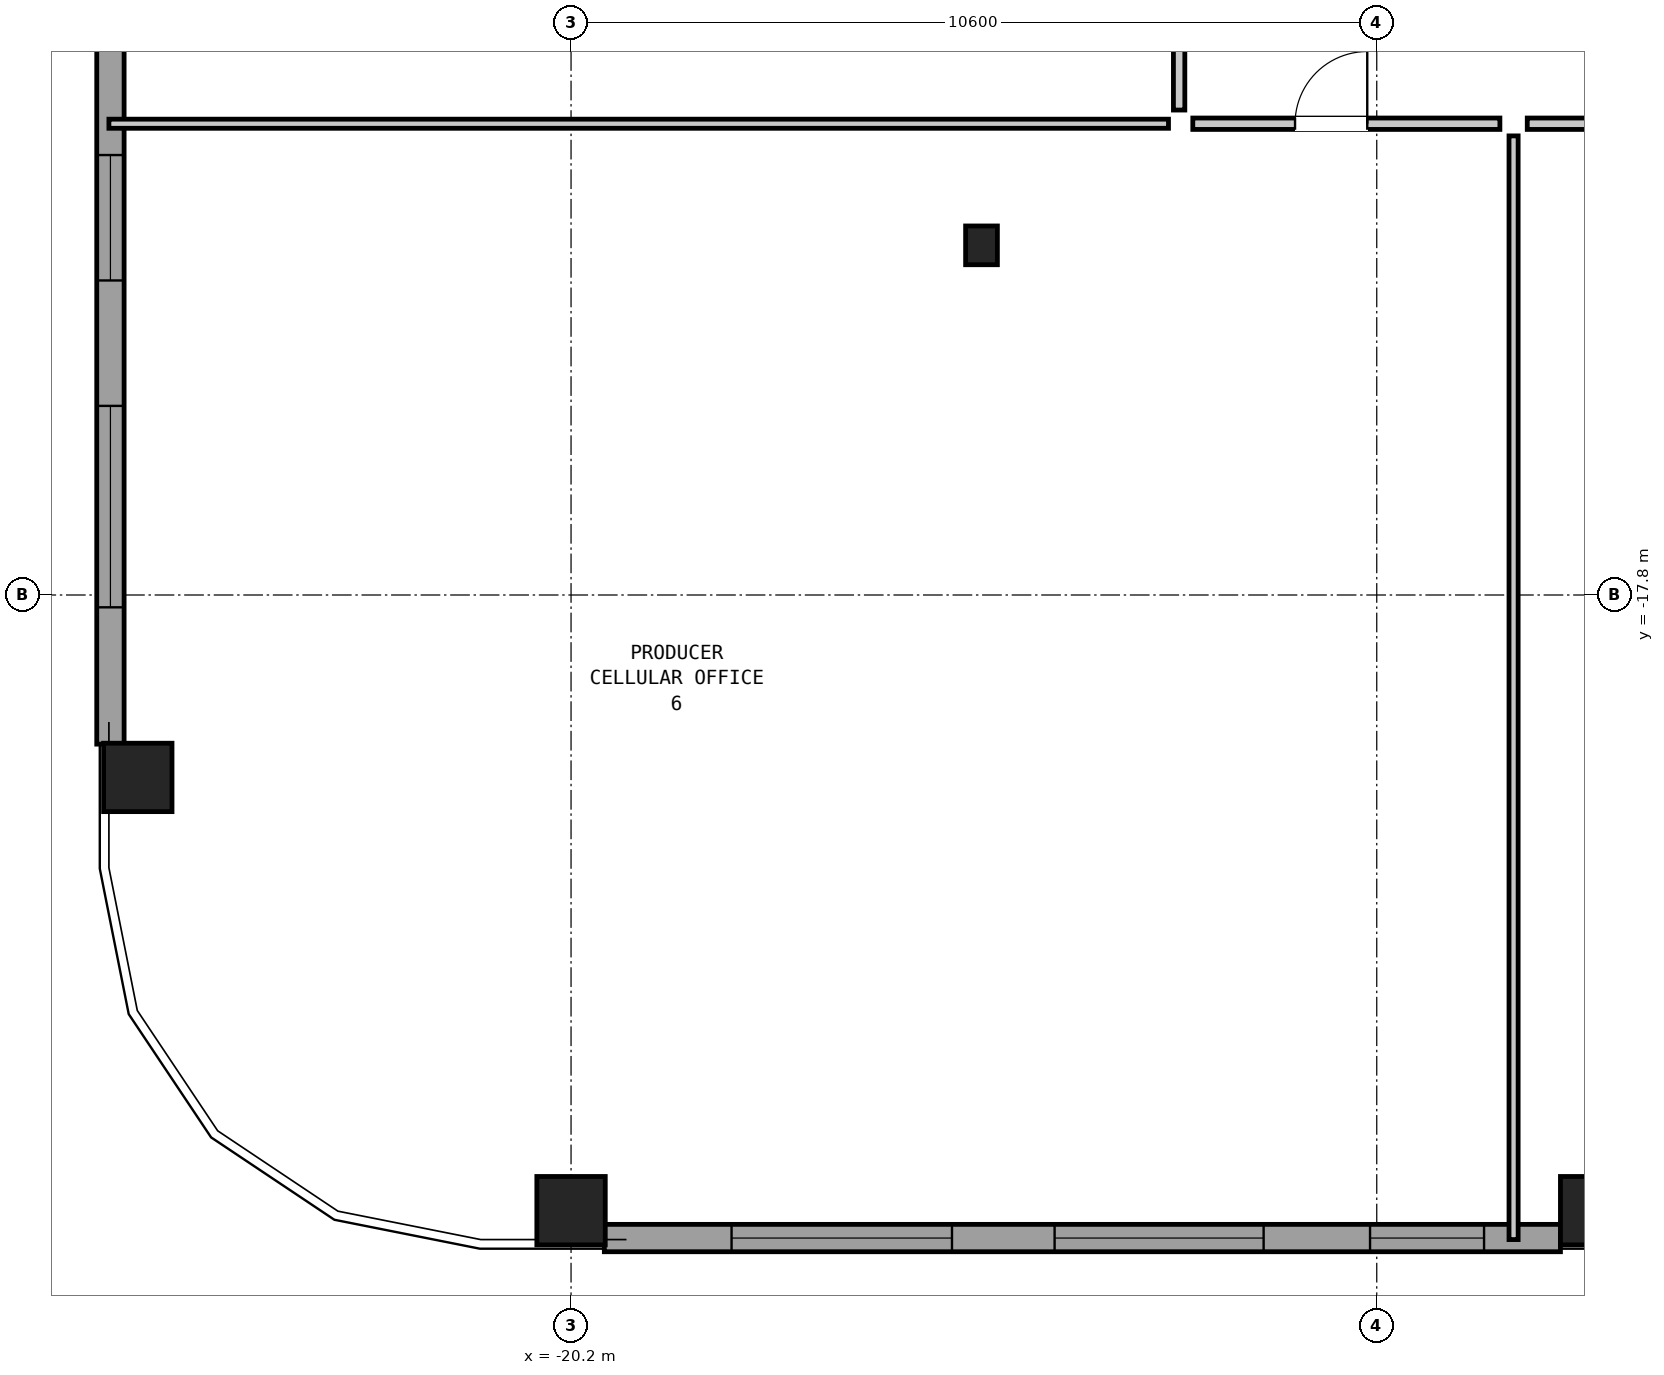
"""IFC4 building model, lengths in metres.
Left out: names, types, materials, properties, quantities, classifications, styles, units other than length and angle.
Written with IfcOpenShell. Run it as: python <this file> out.ifc"""

import sys

from ifc_helpers import new_model, si_unit, direction, frame, frame_2d, origin, origin_2d, place, context, subcontext, project, spatial, rectangle, hollow_rectangle, i_section, extrude, element, fill, save


model = new_model("IFC4")
c1 = context("Model", 3, precision=1e-05, world=origin(), true_north=direction((0.0, 1.0)))
c2 = subcontext(c1, "Body", "Model", "MODEL_VIEW")
j1 = project(units=[si_unit("LENGTHUNIT", "METRE"), si_unit("PLANEANGLEUNIT", "RADIAN")], contexts=[c1])
p1 = place(None, origin())
s1 = spatial("IfcSite", under=j1, at=p1, CompositionType="ELEMENT")
p2 = place(p1, origin())
s2 = spatial("IfcBuilding", under=s1, at=p2, CompositionType="ELEMENT")
p3 = place(p2, frame((0.0, 0.0, 35.25)))
s3 = spatial("IfcBuildingStorey", under=s2, at=p3, CompositionType="ELEMENT", Elevation=35.25)
for number, where, z_axis, x_axis in (
    (1, (-20.2, -25.9, 0.0), (0.0, 0.0, 1.0), (1.0, 0.0, 0.0)),
    (2, (-6.733, -25.9, 0.0), (0.0, 0.0, 1.0), (1.0, 0.0, 0.0)),
    (3, (-25.9, -20.2, 0.0), (0.0, 0.0, 1.0), (0.0, 1.0, 0.0)),
):
    element("IfcColumn", number, at=place(p3, frame(where, z_axis=z_axis, x_axis=x_axis)), inside=s3, PredefinedType="COLUMN", context=c2, shape_type="SweptSolid", body=[
        extrude(hollow_rectangle(XDim=0.9, YDim=0.9, WallThickness=0.055, at=origin_2d()), origin(), (0.0, 0.0, 1.0), 3.05),
    ])
p4 = place(p3, frame((-14.8, -13.2, 0.0), z_axis=(0.0, 0.0, 1.0), x_axis=(1.0, 0.0, 0.0)))
e4 = element("IfcColumn", 4, at=p4, inside=s3, PredefinedType="COLUMN", context=c2, shape_type="SweptSolid", body=[
    extrude(i_section(OverallWidth=0.418, OverallDepth=0.51, WebThickness=0.042, FlangeThickness=0.068, at=origin_2d()), origin(), (0.0, 0.0, 1.0), 3.05),
])
p5 = place(p3, frame((-7.183, -26.26, 0.0), z_axis=(0.0, 0.0, 1.0), x_axis=(-1.0, 0.0, 0.0)))
e5 = element("IfcWall", 5, at=p5, inside=s3, PredefinedType="SOLIDWALL", context=c2, shape_type="SweptSolid", body=[
    extrude(rectangle(XDim=12.579, YDim=0.36, at=frame_2d((6.289, 0.0))), origin(), (0.0, 0.0, 1.0), 2.067),
])
p6 = place(p5, frame((1.005, 0.0, 0.2)))
e6 = element("IfcOpeningElement", 6, at=p6, cuts=e5, PredefinedType="OPENING", context=c2, shape_type="SweptSolid", body=[
    extrude(rectangle(XDim=1.5, YDim=0.95, at=frame_2d((0.75, 0.475))), frame((0.0, 0.192, 0.0), z_axis=(0.0, -1.0, 0.0), x_axis=(1.0, 0.0, 0.0)), (0.0, 0.0, 1.0), 0.384),
])
p7 = place(p5, frame((3.905, 0.0, 0.95)))
e7 = element("IfcOpeningElement", 7, at=p7, cuts=e5, PredefinedType="OPENING", context=c2, shape_type="SweptSolid", body=[
    extrude(rectangle(XDim=2.75, YDim=0.95, at=frame_2d((1.375, 0.475))), frame((0.0, 0.192, 0.0), z_axis=(0.0, -1.0, 0.0), x_axis=(1.0, 0.0, 0.0)), (0.0, 0.0, 1.0), 0.384),
])
p8 = place(p5, frame((8.005, 0.0, 0.2)))
e8 = element("IfcOpeningElement", 8, at=p8, cuts=e5, PredefinedType="OPENING", context=c2, shape_type="SweptSolid", body=[
    extrude(rectangle(XDim=2.9, YDim=0.9, at=frame_2d((1.45, 0.45))), frame((0.0, 0.192, 0.0), z_axis=(0.0, -1.0, 0.0), x_axis=(1.0, 0.0, 0.0)), (0.0, 0.0, 1.0), 0.384),
])
p9 = place(p3, frame((-26.26, -19.762, 0.0), z_axis=(0.0, 0.0, 1.0), x_axis=(0.0, 1.0, 0.0)))
e9 = element("IfcWall", 9, at=p9, inside=s3, PredefinedType="SOLIDWALL", context=c2, shape_type="SweptSolid", body=[
    extrude(rectangle(XDim=12.579, YDim=0.36, at=frame_2d((6.289, 0.0))), origin(), (0.0, 0.0, 1.0), 2.067),
])
p10 = place(p9, frame((1.8, 0.0, 0.2)))
e10 = element("IfcOpeningElement", 10, at=p10, cuts=e9, PredefinedType="OPENING", context=c2, shape_type="SweptSolid", body=[
    extrude(rectangle(XDim=2.65, YDim=1.05, at=frame_2d((1.325, 0.525))), frame((0.0, 0.192, 0.0), z_axis=(0.0, -1.0, 0.0), x_axis=(1.0, 0.0, 0.0)), (0.0, 0.0, 1.0), 0.384),
])
p11 = place(p9, frame((6.1, 0.0, 0.75)))
e11 = element("IfcOpeningElement", 11, at=p11, cuts=e9, PredefinedType="OPENING", context=c2, shape_type="SweptSolid", body=[
    extrude(rectangle(XDim=1.65, YDim=1.15, at=frame_2d((0.825, 0.575))), frame((0.0, 0.192, 0.0), z_axis=(0.0, -1.0, 0.0), x_axis=(1.0, 0.0, 0.0)), (0.0, 0.0, 1.0), 0.384),
])
p12 = place(p9, frame((10.35, 0.0, 0.2)))
e12 = element("IfcOpeningElement", 12, at=p12, cuts=e9, PredefinedType="OPENING", context=c2, shape_type="SweptSolid", body=[
    extrude(rectangle(XDim=2.15, YDim=1.2, at=frame_2d((1.075, 0.6))), frame((0.0, 0.192, 0.0), z_axis=(0.0, -1.0, 0.0), x_axis=(1.0, 0.0, 0.0)), (0.0, 0.0, 1.0), 0.384),
])
p13 = place(p3, frame((-26.28, -11.6, 0.0), z_axis=(0.0, 0.0, 1.0), x_axis=(1.0, 0.0, 0.0)))
e13 = element("IfcWall", 13, at=p13, inside=s3, PredefinedType="PARTITIONING", context=c2, shape_type="SweptSolid", body=[
    extrude(rectangle(XDim=13.94, YDim=0.12, at=frame_2d((6.97, 0.0))), origin(), (0.0, 0.0, 1.0), 2.274),
])
p14 = place(p3, frame((-7.8, -26.28, 0.0), z_axis=(0.0, 0.0, 1.0), x_axis=(0.0, 1.0, 0.0)))
e14 = element("IfcWall", 14, at=p14, inside=s3, PredefinedType="PARTITIONING", context=c2, shape_type="SweptSolid", body=[
    extrude(rectangle(XDim=14.52, YDim=0.12, at=frame_2d((7.26, 0.0))), origin(), (0.0, 0.0, 1.0), 2.83),
])
p15 = place(p3, frame((-12.02, -11.6, 0.0), z_axis=(0.0, 0.0, 1.0), x_axis=(1.0, 0.0, 0.0)))
e15 = element("IfcWall", 15, at=p15, inside=s3, PredefinedType="PARTITIONING", context=c2, shape_type="SweptSolid", body=[
    extrude(rectangle(XDim=4.04, YDim=0.15, at=frame_2d((2.02, 0.0))), origin(), (0.0, 0.0, 1.0), 2.274),
])
p16 = place(p15, frame((1.345, 0.0, 0.0)))
e16 = element("IfcOpeningElement", 16, at=p16, cuts=e15, PredefinedType="OPENING", context=c2, shape_type="SweptSolid", body=[
    extrude(rectangle(XDim=0.95, YDim=2.1, at=frame_2d((0.475, 1.05))), frame((0.0, 0.087, 0.0), z_axis=(0.0, -1.0, 0.0), x_axis=(1.0, 0.0, 0.0)), (0.0, 0.0, 1.0), 0.174),
])
p17 = place(p3, frame((-7.62, -11.6, 0.0), z_axis=(0.0, 0.0, 1.0), x_axis=(1.0, 0.0, 0.0)))
e17 = element("IfcWall", 17, at=p17, inside=s3, PredefinedType="PARTITIONING", context=c2, shape_type="SweptSolid", body=[
    extrude(rectangle(XDim=5.24, YDim=0.15, at=frame_2d((2.62, 0.0))), origin(), (0.0, 0.0, 1.0), 2.83),
])
p18 = place(p17, frame((2.145, 0.0, 0.0)))
e18 = element("IfcOpeningElement", 18, at=p18, cuts=e17, PredefinedType="OPENING", context=c2, shape_type="SweptSolid", body=[
    extrude(rectangle(XDim=0.95, YDim=2.1, at=frame_2d((0.475, 1.05))), frame((0.0, 0.087, 0.0), z_axis=(0.0, -1.0, 0.0), x_axis=(1.0, 0.0, 0.0)), (0.0, 0.0, 1.0), 0.174),
])
p19 = place(p3, frame((-12.2, -11.42, 0.0), z_axis=(0.0, 0.0, 1.0), x_axis=(0.0, 1.0, 0.0)))
e19 = element("IfcWall", 19, at=p19, inside=s3, PredefinedType="PARTITIONING", context=c2, shape_type="SweptSolid", body=[
    extrude(rectangle(XDim=11.24, YDim=0.15, at=frame_2d((5.62, 0.0))), origin(), (0.0, 0.0, 1.0), 2.83),
])
p20 = place(p19, frame((5.145, 0.0, 0.0)))
e20 = element("IfcOpeningElement", 20, at=p20, cuts=e19, PredefinedType="OPENING", context=c2, shape_type="SweptSolid", body=[
    extrude(rectangle(XDim=0.95, YDim=2.1, at=frame_2d((0.475, 1.05))), frame((0.0, 0.087, 0.0), z_axis=(0.0, -1.0, 0.0), x_axis=(1.0, 0.0, 0.0)), (0.0, 0.0, 1.0), 0.174),
])
p21 = place(p6, origin())
e21 = element("IfcWindow", 21, at=p21, inside=s3, PartitioningType="SINGLE_PANEL", PredefinedType="WINDOW", context=c2, shape_type="SweptSolid", body=[
    extrude(rectangle(XDim=1.5, YDim=0.95, at=frame_2d((0.75, 0.475))), frame((0.0, 0.03, 0.0), z_axis=(0.0, -1.0, 0.0), x_axis=(1.0, 0.0, 0.0)), (0.0, 0.0, 1.0), 0.06),
])
fill(e6, e21)
p22 = place(p7, origin())
e22 = element("IfcWindow", 22, at=p22, inside=s3, PartitioningType="SINGLE_PANEL", PredefinedType="WINDOW", context=c2, shape_type="SweptSolid", body=[
    extrude(rectangle(XDim=2.75, YDim=0.95, at=frame_2d((1.375, 0.475))), frame((0.0, 0.03, 0.0), z_axis=(0.0, -1.0, 0.0), x_axis=(1.0, 0.0, 0.0)), (0.0, 0.0, 1.0), 0.06),
])
fill(e7, e22)
p23 = place(p8, origin())
e23 = element("IfcWindow", 23, at=p23, inside=s3, PartitioningType="SINGLE_PANEL", PredefinedType="WINDOW", context=c2, shape_type="SweptSolid", body=[
    extrude(rectangle(XDim=2.9, YDim=0.9, at=frame_2d((1.45, 0.45))), frame((0.0, 0.03, 0.0), z_axis=(0.0, -1.0, 0.0), x_axis=(1.0, 0.0, 0.0)), (0.0, 0.0, 1.0), 0.06),
])
fill(e8, e23)
p24 = place(p10, origin())
e24 = element("IfcWindow", 24, at=p24, inside=s3, PartitioningType="SINGLE_PANEL", PredefinedType="WINDOW", context=c2, shape_type="SweptSolid", body=[
    extrude(rectangle(XDim=2.65, YDim=1.05, at=frame_2d((1.325, 0.525))), frame((0.0, 0.03, 0.0), z_axis=(0.0, -1.0, 0.0), x_axis=(1.0, 0.0, 0.0)), (0.0, 0.0, 1.0), 0.06),
])
fill(e10, e24)
p25 = place(p11, origin())
e25 = element("IfcWindow", 25, at=p25, inside=s3, PartitioningType="SINGLE_PANEL", PredefinedType="WINDOW", context=c2, shape_type="SweptSolid", body=[
    extrude(rectangle(XDim=1.65, YDim=1.15, at=frame_2d((0.825, 0.575))), frame((0.0, 0.03, 0.0), z_axis=(0.0, -1.0, 0.0), x_axis=(1.0, 0.0, 0.0)), (0.0, 0.0, 1.0), 0.06),
])
fill(e11, e25)
p26 = place(p16, origin())
e26 = element("IfcDoor", 26, at=p26, inside=s3, OperationType="SINGLE_SWING_RIGHT", PredefinedType="DOOR", context=c2, shape_type="SweptSolid", body=[
    extrude(rectangle(XDim=0.95, YDim=2.1, at=frame_2d((0.475, 1.05))), frame((0.0, 0.025, 0.0), z_axis=(0.0, -1.0, 0.0), x_axis=(1.0, 0.0, 0.0)), (0.0, 0.0, 1.0), 0.05),
])
fill(e16, e26)
save(model, sys.argv[1])
